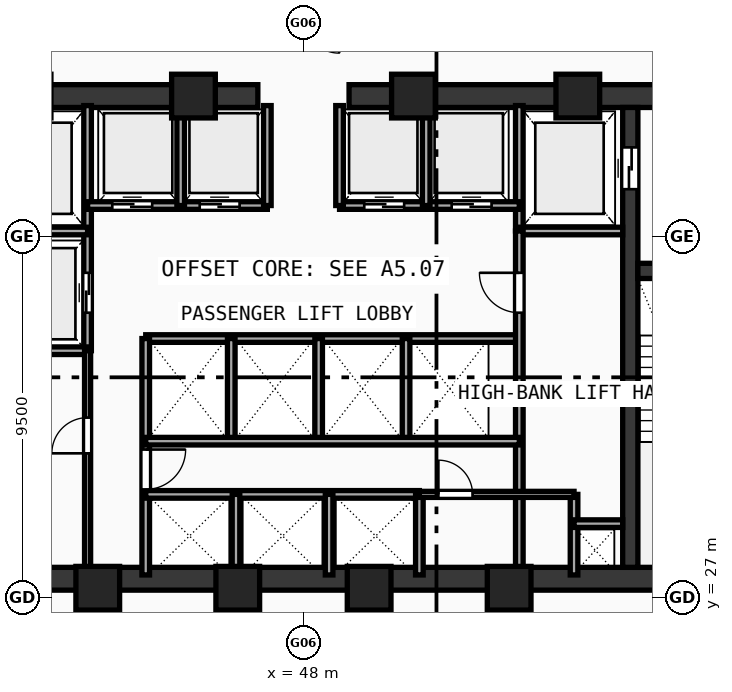
"""IFC4 building model, lengths in metres.
Left out: names, types, materials, properties, quantities, classifications, styles, units other than length and angle.
Written with IfcOpenShell. Run it as: python <this file> out.ifc"""

import sys

from ifc_helpers import new_model, si_unit, direction, frame, frame_2d, origin, origin_with_axes, origin_2d, place, context, subcontext, project, spatial, rectangle, hollow_rectangle, extrude, source, transform, mapped, element, fill, save


model = new_model("IFC4")
c1 = context("Model", 3, precision=1e-05, world=origin(), true_north=direction((0.0, 1.0)))
c2 = subcontext(c1, "Body", "Model", "MODEL_VIEW")
j1 = project(units=[si_unit("LENGTHUNIT", "METRE"), si_unit("PLANEANGLEUNIT", "RADIAN")], contexts=[c1])
p1 = place(None, origin())
s1 = spatial("IfcSite", under=j1, at=p1, CompositionType="ELEMENT")
p2 = place(p1, origin())
s2 = spatial("IfcBuilding", under=s1, at=p2, CompositionType="ELEMENT")
p3 = place(p2, frame((0.0, 0.0, 81.18)))
s3 = spatial("IfcBuildingStorey", under=s2, at=p3, CompositionType="ELEMENT", Elevation=81.18)
p4 = place(p3, frame((35.5, 27.5, 0.0), z_axis=(0.0, 0.0, 1.0), x_axis=(1.0, 0.0, 0.0)))
e1 = element("IfcWall", 1, at=p4, inside=s3, PredefinedType="SHEAR", context=c2, shape_type="SweptSolid", body=[
    extrude(rectangle(XDim=25.0, YDim=0.6, at=frame_2d((12.5, 0.0))), origin(), (0.0, 0.0, 1.0), 3.54),
])
p5 = place(p3, frame((35.5, 40.2, 0.0), z_axis=(0.0, 0.0, 1.0), x_axis=(1.0, 0.0, 0.0)))
e2 = element("IfcWall", 2, at=p5, inside=s3, PredefinedType="SHEAR", context=c2, shape_type="SweptSolid", body=[
    extrude(rectangle(XDim=11.3, YDim=0.6, at=frame_2d((5.65, 0.0))), origin(), (0.0, 0.0, 1.0), 3.54),
])
p6 = place(p5, frame((1.65, 0.0, 0.0)))
e3 = element("IfcOpeningElement", 3, at=p6, cuts=e2, PredefinedType="OPENING", context=c2, shape_type="SweptSolid", body=[
    extrude(rectangle(XDim=1.05, YDim=2.1, at=frame_2d((0.525, 1.05))), frame((0.0, 0.31, 0.0), z_axis=(0.0, -1.0, 0.0), x_axis=(1.0, 0.0, 0.0)), (0.0, 0.0, 1.0), 0.62),
])
p7 = place(p3, frame((49.2, 40.2, 0.0), z_axis=(0.0, 0.0, 1.0), x_axis=(1.0, 0.0, 0.0)))
e4 = element("IfcWall", 4, at=p7, inside=s3, PredefinedType="SHEAR", context=c2, shape_type="SweptSolid", body=[
    extrude(rectangle(XDim=11.3, YDim=0.6, at=frame_2d((5.65, 0.0))), origin(), (0.0, 0.0, 1.0), 3.54),
])
p8 = place(p7, frame((8.6, 0.0, 0.0)))
e5 = element("IfcOpeningElement", 5, at=p8, cuts=e4, PredefinedType="OPENING", context=c2, shape_type="SweptSolid", body=[
    extrude(rectangle(XDim=1.05, YDim=2.1, at=frame_2d((0.525, 1.05))), frame((0.0, 0.31, 0.0), z_axis=(0.0, -1.0, 0.0), x_axis=(1.0, 0.0, 0.0)), (0.0, 0.0, 1.0), 0.62),
])
p9 = place(p3, frame((56.6, 27.8, 0.0), z_axis=(0.0, 0.0, 1.0), x_axis=(0.0, 1.0, 0.0)))
e6 = element("IfcWall", 6, at=p9, inside=s3, PredefinedType="SHEAR", context=c2, shape_type="SweptSolid", body=[
    extrude(rectangle(XDim=12.1, YDim=0.4, at=frame_2d((6.05, 0.0))), origin(), (0.0, 0.0, 1.0), 3.54),
])
p10 = place(p9, frame((9.95, 0.0, 0.0)))
e7 = element("IfcOpeningElement", 7, at=p10, cuts=e6, PredefinedType="OPENING", context=c2, shape_type="SweptSolid", body=[
    extrude(rectangle(XDim=1.1, YDim=2.1, at=frame_2d((0.55, 1.05))), frame((0.0, 0.21, 0.0), z_axis=(0.0, -1.0, 0.0), x_axis=(1.0, 0.0, 0.0)), (0.0, 0.0, 1.0), 0.42),
])
p11 = place(p3, frame((56.8, 35.6, 0.0), z_axis=(0.0, 0.0, 1.0), x_axis=(1.0, 0.0, 0.0)))
e8 = element("IfcWall", 8, at=p11, inside=s3, PredefinedType="SHEAR", context=c2, shape_type="SweptSolid", body=[
    extrude(rectangle(XDim=3.1, YDim=0.4, at=frame_2d((1.55, 0.0))), origin(), (0.0, 0.0, 1.0), 3.54),
])
p12 = place(p11, frame((1.02, 0.0, 0.0)))
e9 = element("IfcOpeningElement", 9, at=p12, cuts=e8, PredefinedType="OPENING", context=c2, shape_type="SweptSolid", body=[
    extrude(rectangle(XDim=1.05, YDim=2.1, at=frame_2d((0.525, 1.05))), frame((0.0, 0.21, 0.0), z_axis=(0.0, -1.0, 0.0), x_axis=(1.0, 0.0, 0.0)), (0.0, 0.0, 1.0), 0.42),
])
m1 = source(origin(), c2, "Body", "SweptSolid", [
    extrude(hollow_rectangle(XDim=1.15, YDim=1.15, WallThickness=0.048, at=origin_2d()), origin(), (0.0, 0.0, 1.0), 3.8),
])
for number, where, z_axis, x_axis in (
    (10, (42.588, 27.25, -0.26), (0.0, 0.0, 1.0), (1.0, 0.0, 0.0)),
    (11, (46.272, 27.25, -0.26), (0.0, 0.0, 1.0), (1.0, 0.0, 0.0)),
    (12, (49.729, 27.25, -0.26), (0.0, 0.0, 1.0), (1.0, 0.0, 0.0)),
    (13, (53.412, 27.25, -0.26), (0.0, 0.0, 1.0), (1.0, 0.0, 0.0)),
    (14, (55.219, 40.2, -0.26), (0.0, 0.0, 1.0), (1.0, 0.0, 0.0)),
    (15, (50.894, 40.2, -0.26), (0.0, 0.0, 1.0), (1.0, 0.0, 0.0)),
    (16, (45.106, 40.2, -0.26), (0.0, 0.0, 1.0), (1.0, 0.0, 0.0)),
):
    element("IfcColumn", number, at=place(p3, frame(where, z_axis=z_axis, x_axis=x_axis)), inside=s3, PredefinedType="COLUMN", context=c2, shape_type="MappedRepresentation", body=[
        mapped(m1, transform((0.0, 0.0, 0.0), scale=1.0)),
    ])
p13 = place(p3, frame((42.32, 33.5, 0.0), z_axis=(0.0, 0.0, 1.0), x_axis=(0.0, 1.0, 0.0)))
e17 = element("IfcWall", 17, at=p13, inside=s3, PredefinedType="SOLIDWALL", context=c2, shape_type="SweptSolid", body=[
    extrude(rectangle(XDim=6.45, YDim=0.2, at=frame_2d((3.225, 0.0))), origin(), (0.0, 0.0, 1.0), 3.54),
])
p14 = place(p13, frame((1.0, 0.0, 0.0)))
e18 = element("IfcOpeningElement", 18, at=p14, cuts=e17, PredefinedType="OPENING", context=c2, shape_type="SweptSolid", body=[
    extrude(rectangle(XDim=1.05, YDim=2.1, at=frame_2d((0.525, 1.05))), frame((0.0, 0.11, 0.0), z_axis=(0.0, -1.0, 0.0), x_axis=(1.0, 0.0, 0.0)), (0.0, 0.0, 1.0), 0.22),
])
for number, where, z_axis, x_axis in (
    (19, (39.6, 36.65, 0.0), (0.0, 0.0, 1.0), (1.0, 0.0, 0.0)),
    (20, (39.6, 33.5, 0.0), (0.0, 0.0, 1.0), (1.0, 0.0, 0.0)),
):
    element("IfcWall", number, at=place(p3, frame(where, z_axis=z_axis, x_axis=x_axis)), inside=s3, PredefinedType="SOLIDWALL", context=c2, shape_type="SweptSolid", body=[
        extrude(rectangle(XDim=2.72, YDim=0.2, at=frame_2d((1.36, 0.0))), origin(), (0.0, 0.0, 1.0), 3.54),
    ])
p15 = place(p3, frame((53.68, 36.65, 0.0), z_axis=(0.0, 0.0, 1.0), x_axis=(0.0, 1.0, 0.0)))
e21 = element("IfcWall", 21, at=p15, inside=s3, PredefinedType="SOLIDWALL", context=c2, shape_type="SweptSolid", body=[
    extrude(rectangle(XDim=3.3, YDim=0.2, at=frame_2d((1.65, 0.0))), origin(), (0.0, 0.0, 1.0), 3.54),
])
p16 = place(p3, frame((53.68, 36.65, 0.0), z_axis=(0.0, 0.0, 1.0), x_axis=(1.0, 0.0, 0.0)))
e22 = element("IfcWall", 22, at=p16, inside=s3, PredefinedType="SOLIDWALL", context=c2, shape_type="SweptSolid", body=[
    extrude(rectangle(XDim=2.72, YDim=0.2, at=frame_2d((1.36, 0.0))), origin(), (0.0, 0.0, 1.0), 3.54),
])
p17 = place(p3, frame((42.32, 37.32, 0.0), z_axis=(0.0, 0.0, 1.0), x_axis=(1.0, 0.0, 0.0)))
e23 = element("IfcWall", 23, at=p17, inside=s3, PredefinedType="SOLIDWALL", context=c2, shape_type="SweptSolid", body=[
    extrude(rectangle(XDim=4.73, YDim=0.2, at=frame_2d((2.365, 0.0))), origin(), (0.0, 0.0, 1.0), 3.54),
])
p18 = place(p17, frame((0.65, 0.0, 0.0)))
e24 = element("IfcOpeningElement", 24, at=p18, cuts=e23, PredefinedType="OPENING", context=c2, shape_type="SweptSolid", body=[
    extrude(rectangle(XDim=1.05, YDim=2.1, at=frame_2d((0.525, 1.05))), frame((0.0, 0.11, 0.0), z_axis=(0.0, -1.0, 0.0), x_axis=(1.0, 0.0, 0.0)), (0.0, 0.0, 1.0), 0.22),
])
p19 = place(p17, frame((2.95, 0.0, 0.0)))
e25 = element("IfcOpeningElement", 25, at=p19, cuts=e23, PredefinedType="OPENING", context=c2, shape_type="SweptSolid", body=[
    extrude(rectangle(XDim=1.05, YDim=2.1, at=frame_2d((0.525, 1.05))), frame((0.0, 0.11, 0.0), z_axis=(0.0, -1.0, 0.0), x_axis=(1.0, 0.0, 0.0)), (0.0, 0.0, 1.0), 0.22),
])
p20 = place(p3, frame((48.95, 37.32, 0.0), z_axis=(0.0, 0.0, 1.0), x_axis=(1.0, 0.0, 0.0)))
e26 = element("IfcWall", 26, at=p20, inside=s3, PredefinedType="SOLIDWALL", context=c2, shape_type="SweptSolid", body=[
    extrude(rectangle(XDim=4.73, YDim=0.2, at=frame_2d((2.365, 0.0))), origin(), (0.0, 0.0, 1.0), 3.54),
])
p21 = place(p20, frame((0.65, 0.0, 0.0)))
e27 = element("IfcOpeningElement", 27, at=p21, cuts=e26, PredefinedType="OPENING", context=c2, shape_type="SweptSolid", body=[
    extrude(rectangle(XDim=1.05, YDim=2.1, at=frame_2d((0.525, 1.05))), frame((0.0, 0.11, 0.0), z_axis=(0.0, -1.0, 0.0), x_axis=(1.0, 0.0, 0.0)), (0.0, 0.0, 1.0), 0.22),
])
p22 = place(p20, frame((2.95, 0.0, 0.0)))
e28 = element("IfcOpeningElement", 28, at=p22, cuts=e26, PredefinedType="OPENING", context=c2, shape_type="SweptSolid", body=[
    extrude(rectangle(XDim=1.05, YDim=2.1, at=frame_2d((0.525, 1.05))), frame((0.0, 0.11, 0.0), z_axis=(0.0, -1.0, 0.0), x_axis=(1.0, 0.0, 0.0)), (0.0, 0.0, 1.0), 0.22),
])
for number, where, z_axis, x_axis in (
    (29, (47.05, 37.32, 0.0), (0.0, 0.0, 1.0), (0.0, 1.0, 0.0)),
    (30, (48.95, 37.32, 0.0), (0.0, 0.0, 1.0), (0.0, 1.0, 0.0)),
    (31, (44.77, 37.32, 0.0), (0.0, 0.0, 1.0), (0.0, 1.0, 0.0)),
    (32, (51.23, 37.32, 0.0), (0.0, 0.0, 1.0), (0.0, 1.0, 0.0)),
):
    element("IfcWall", number, at=place(p3, frame(where, z_axis=z_axis, x_axis=x_axis)), inside=s3, PredefinedType="SOLIDWALL", context=c2, shape_type="SweptSolid", body=[
        extrude(rectangle(XDim=2.63, YDim=0.2, at=frame_2d((1.315, 0.0))), origin(), (0.0, 0.0, 1.0), 3.54),
    ])
p23 = place(p3, frame((43.85, 33.82, 0.0), z_axis=(0.0, 0.0, 1.0), x_axis=(1.0, 0.0, 0.0)))
e33 = element("IfcWall", 33, at=p23, inside=s3, PredefinedType="SOLIDWALL", context=c2, shape_type="SweptSolid", body=[
    extrude(rectangle(XDim=9.83, YDim=0.2, at=frame_2d((4.915, 0.0))), origin(), (0.0, 0.0, 1.0), 3.54),
])
p24 = place(p3, frame((43.85, 27.6, 0.0), z_axis=(0.0, 0.0, 1.0), x_axis=(0.0, 1.0, 0.0)))
e34 = element("IfcWall", 34, at=p24, inside=s3, PredefinedType="SOLIDWALL", context=c2, shape_type="SweptSolid", body=[
    extrude(rectangle(XDim=6.22, YDim=0.2, at=frame_2d((3.11, 0.0))), origin(), (0.0, 0.0, 1.0), 3.54),
])
p25 = place(p24, frame((2.25, 0.0, 0.0)))
e35 = element("IfcOpeningElement", 35, at=p25, cuts=e34, PredefinedType="OPENING", context=c2, shape_type="SweptSolid", body=[
    extrude(rectangle(XDim=1.05, YDim=2.1, at=frame_2d((0.525, 1.05))), frame((0.0, 0.11, 0.0), z_axis=(0.0, -1.0, 0.0), x_axis=(1.0, 0.0, 0.0)), (0.0, 0.0, 1.0), 0.22),
])
p26 = place(p3, frame((53.68, 27.6, 0.0), z_axis=(0.0, 0.0, 1.0), x_axis=(0.0, 1.0, 0.0)))
e36 = element("IfcWall", 36, at=p26, inside=s3, PredefinedType="SOLIDWALL", context=c2, shape_type="SweptSolid", body=[
    extrude(rectangle(XDim=9.05, YDim=0.2, at=frame_2d((4.525, 0.0))), origin(), (0.0, 0.0, 1.0), 3.54),
])
p27 = place(p26, frame((6.9, 0.0, 0.0)))
e37 = element("IfcOpeningElement", 37, at=p27, cuts=e36, PredefinedType="OPENING", context=c2, shape_type="SweptSolid", body=[
    extrude(rectangle(XDim=1.05, YDim=2.1, at=frame_2d((0.525, 1.05))), frame((0.0, 0.11, 0.0), z_axis=(0.0, -1.0, 0.0), x_axis=(1.0, 0.0, 0.0)), (0.0, 0.0, 1.0), 0.22),
])
for number, where, z_axis, x_axis in (
    (38, (46.1, 31.12, 0.0), (0.0, 0.0, 1.0), (0.0, 1.0, 0.0)),
    (39, (48.4, 31.12, 0.0), (0.0, 0.0, 1.0), (0.0, 1.0, 0.0)),
    (40, (50.7, 31.12, 0.0), (0.0, 0.0, 1.0), (0.0, 1.0, 0.0)),
):
    element("IfcWall", number, at=place(p3, frame(where, z_axis=z_axis, x_axis=x_axis)), inside=s3, PredefinedType="SOLIDWALL", context=c2, shape_type="SweptSolid", body=[
        extrude(rectangle(XDim=2.7, YDim=0.2, at=frame_2d((1.35, 0.0))), origin(), (0.0, 0.0, 1.0), 3.54),
    ])
p28 = place(p3, frame((43.85, 29.72, 0.0), z_axis=(0.0, 0.0, 1.0), x_axis=(1.0, 0.0, 0.0)))
e41 = element("IfcWall", 41, at=p28, inside=s3, PredefinedType="SOLIDWALL", context=c2, shape_type="SweptSolid", body=[
    extrude(rectangle(XDim=7.2, YDim=0.2, at=frame_2d((3.6, 0.0))), origin(), (0.0, 0.0, 1.0), 3.54),
])
p29 = place(p3, frame((51.05, 27.6, 0.0), z_axis=(0.0, 0.0, 1.0), x_axis=(0.0, 1.0, 0.0)))
e42 = element("IfcWall", 42, at=p29, inside=s3, PredefinedType="SOLIDWALL", context=c2, shape_type="SweptSolid", body=[
    extrude(rectangle(XDim=2.12, YDim=0.2, at=frame_2d((1.06, 0.0))), origin(), (0.0, 0.0, 1.0), 3.54),
])
p30 = place(p3, frame((43.85, 31.12, 0.0), z_axis=(0.0, 0.0, 1.0), x_axis=(1.0, 0.0, 0.0)))
e43 = element("IfcWall", 43, at=p30, inside=s3, PredefinedType="SOLIDWALL", context=c2, shape_type="SweptSolid", body=[
    extrude(rectangle(XDim=9.83, YDim=0.2, at=frame_2d((4.915, 0.0))), origin(), (0.0, 0.0, 1.0), 3.54),
])
for number, where, z_axis, x_axis in (
    (44, (46.225, 27.6, 0.0), (0.0, 0.0, 1.0), (0.0, 1.0, 0.0)),
    (45, (48.675, 27.6, 0.0), (0.0, 0.0, 1.0), (0.0, 1.0, 0.0)),
    (46, (55.12, 27.6, 0.0), (0.0, 0.0, 1.0), (0.0, 1.0, 0.0)),
):
    element("IfcWall", number, at=place(p3, frame(where, z_axis=z_axis, x_axis=x_axis)), inside=s3, PredefinedType="SOLIDWALL", context=c2, shape_type="SweptSolid", body=[
        extrude(rectangle(XDim=2.12, YDim=0.2, at=frame_2d((1.06, 0.0))), origin(), (0.0, 0.0, 1.0), 3.54),
    ])
p31 = place(p3, frame((55.12, 28.95, 0.0), z_axis=(0.0, 0.0, 1.0), x_axis=(1.0, 0.0, 0.0)))
e47 = element("IfcWall", 47, at=p31, inside=s3, PredefinedType="SOLIDWALL", context=c2, shape_type="SweptSolid", body=[
    extrude(rectangle(XDim=1.28, YDim=0.2, at=frame_2d((0.64, 0.0))), origin(), (0.0, 0.0, 1.0), 3.54),
])
p32 = place(p3, frame((42.32, 27.6, 0.0), z_axis=(0.0, 0.0, 1.0), x_axis=(0.0, 1.0, 0.0)))
e48 = element("IfcWall", 48, at=p32, inside=s3, PredefinedType="PARTITIONING", context=c2, shape_type="SweptSolid", body=[
    extrude(rectangle(XDim=5.9, YDim=0.16, at=frame_2d((2.95, 0.0))), origin(), (0.0, 0.0, 1.0), 3.54),
])
p33 = place(p32, frame((3.2, 0.0, 0.0)))
e49 = element("IfcOpeningElement", 49, at=p33, cuts=e48, PredefinedType="OPENING", context=c2, shape_type="SweptSolid", body=[
    extrude(rectangle(XDim=0.94, YDim=2.1, at=frame_2d((0.47, 1.05))), frame((0.0, 0.09, 0.0), z_axis=(0.0, -1.0, 0.0), x_axis=(1.0, 0.0, 0.0)), (0.0, 0.0, 1.0), 0.18),
])
p34 = place(p3, frame((51.05, 29.72, 0.0), z_axis=(0.0, 0.0, 1.0), x_axis=(1.0, 0.0, 0.0)))
e50 = element("IfcWall", 50, at=p34, inside=s3, PredefinedType="PARTITIONING", context=c2, shape_type="SweptSolid", body=[
    extrude(rectangle(XDim=4.07, YDim=0.16, at=frame_2d((2.035, 0.0))), origin(), (0.0, 0.0, 1.0), 3.54),
])
p35 = place(p34, frame((0.5, 0.0, 0.0)))
e51 = element("IfcOpeningElement", 51, at=p35, cuts=e50, PredefinedType="OPENING", context=c2, shape_type="SweptSolid", body=[
    extrude(rectangle(XDim=0.9, YDim=2.1, at=frame_2d((0.45, 1.05))), frame((0.0, 0.09, 0.0), z_axis=(0.0, -1.0, 0.0), x_axis=(1.0, 0.0, 0.0)), (0.0, 0.0, 1.0), 0.18),
])
m2 = source(origin(), c2, "Body", "SweptSolid", [
    extrude(rectangle(XDim=1.1, YDim=2.1, at=frame_2d((0.55, 1.05))), frame((0.0, 0.025, 0.0), z_axis=(0.0, -1.0, 0.0), x_axis=(1.0, 0.0, 0.0)), (0.0, 0.0, 1.0), 0.05),
])
p36 = place(p10, origin_with_axes())
e52 = element("IfcDoor", 52, at=p36, inside=s3, OperationType="DOUBLE_DOOR_SLIDING", PredefinedType="DOOR", context=c2, shape_type="MappedRepresentation", body=[
    mapped(m2, transform((0.0, 0.0, 0.0), scale=1.0)),
])
fill(e7, e52)
m3 = source(origin(), c2, "Body", "SweptSolid", [
    extrude(rectangle(XDim=1.05, YDim=2.1, at=frame_2d((0.525, 1.05))), frame((0.0, 0.025, 0.0), z_axis=(0.0, -1.0, 0.0), x_axis=(1.0, 0.0, 0.0)), (0.0, 0.0, 1.0), 0.05),
])
p37 = place(p14, origin_with_axes())
e53 = element("IfcDoor", 53, at=p37, inside=s3, OperationType="DOUBLE_DOOR_SLIDING", PredefinedType="DOOR", context=c2, shape_type="MappedRepresentation", body=[
    mapped(m3, transform((0.0, 0.0, 0.0), scale=1.0)),
])
fill(e18, e53)
p38 = place(p18, frame((1.05, 0.0, 0.0), z_axis=(0.0, 0.0, 1.0), x_axis=(-1.0, 0.0, 0.0)))
e54 = element("IfcDoor", 54, at=p38, inside=s3, OperationType="DOUBLE_DOOR_SLIDING", PredefinedType="DOOR", context=c2, shape_type="MappedRepresentation", body=[
    mapped(m3, transform((0.0, 0.0, 0.0), scale=1.0)),
])
fill(e24, e54)
p39 = place(p19, frame((1.05, 0.0, 0.0), z_axis=(0.0, 0.0, 1.0), x_axis=(-1.0, 0.0, 0.0)))
e55 = element("IfcDoor", 55, at=p39, inside=s3, OperationType="DOUBLE_DOOR_SLIDING", PredefinedType="DOOR", context=c2, shape_type="MappedRepresentation", body=[
    mapped(m3, transform((0.0, 0.0, 0.0), scale=1.0)),
])
fill(e25, e55)
p40 = place(p21, frame((1.05, 0.0, 0.0), z_axis=(0.0, 0.0, 1.0), x_axis=(-1.0, 0.0, 0.0)))
e56 = element("IfcDoor", 56, at=p40, inside=s3, OperationType="DOUBLE_DOOR_SLIDING", PredefinedType="DOOR", context=c2, shape_type="MappedRepresentation", body=[
    mapped(m3, transform((0.0, 0.0, 0.0), scale=1.0)),
])
fill(e27, e56)
p41 = place(p22, frame((1.05, 0.0, 0.0), z_axis=(0.0, 0.0, 1.0), x_axis=(-1.0, 0.0, 0.0)))
e57 = element("IfcDoor", 57, at=p41, inside=s3, OperationType="DOUBLE_DOOR_SLIDING", PredefinedType="DOOR", context=c2, shape_type="MappedRepresentation", body=[
    mapped(m3, transform((0.0, 0.0, 0.0), scale=1.0)),
])
fill(e28, e57)
p42 = place(p25, frame((1.05, 0.0, 0.0), z_axis=(0.0, 0.0, 1.0), x_axis=(-1.0, 0.0, 0.0)))
e58 = element("IfcDoor", 58, at=p42, inside=s3, OperationType="SINGLE_SWING_LEFT", PredefinedType="DOOR", context=c2, shape_type="MappedRepresentation", body=[
    mapped(m3, transform((0.0, 0.0, 0.0), scale=1.0)),
])
fill(e35, e58)
p43 = place(p27, origin_with_axes())
e59 = element("IfcDoor", 59, at=p43, inside=s3, OperationType="SINGLE_SWING_RIGHT", PredefinedType="DOOR", context=c2, shape_type="MappedRepresentation", body=[
    mapped(m3, transform((0.0, 0.0, 0.0), scale=1.0)),
])
fill(e37, e59)
m4 = source(origin(), c2, "Body", "SweptSolid", [
    extrude(rectangle(XDim=0.94, YDim=2.1, at=frame_2d((0.47, 1.05))), frame((0.0, 0.025, 0.0), z_axis=(0.0, -1.0, 0.0), x_axis=(1.0, 0.0, 0.0)), (0.0, 0.0, 1.0), 0.05),
])
p44 = place(p33, origin_with_axes())
e60 = element("IfcDoor", 60, at=p44, inside=s3, OperationType="SINGLE_SWING_LEFT", PredefinedType="DOOR", context=c2, shape_type="MappedRepresentation", body=[
    mapped(m4, transform((0.0, 0.0, 0.0), scale=1.0)),
])
fill(e49, e60)
m5 = source(origin(), c2, "Body", "SweptSolid", [
    extrude(rectangle(XDim=0.9, YDim=2.1, at=frame_2d((0.45, 1.05))), frame((0.0, 0.025, 0.0), z_axis=(0.0, -1.0, 0.0), x_axis=(1.0, 0.0, 0.0)), (0.0, 0.0, 1.0), 0.05),
])
p45 = place(p35, origin_with_axes())
e61 = element("IfcDoor", 61, at=p45, inside=s3, OperationType="SINGLE_SWING_LEFT", PredefinedType="DOOR", context=c2, shape_type="MappedRepresentation", body=[
    mapped(m5, transform((0.0, 0.0, 0.0), scale=1.0)),
])
fill(e51, e61)
save(model, sys.argv[1])
